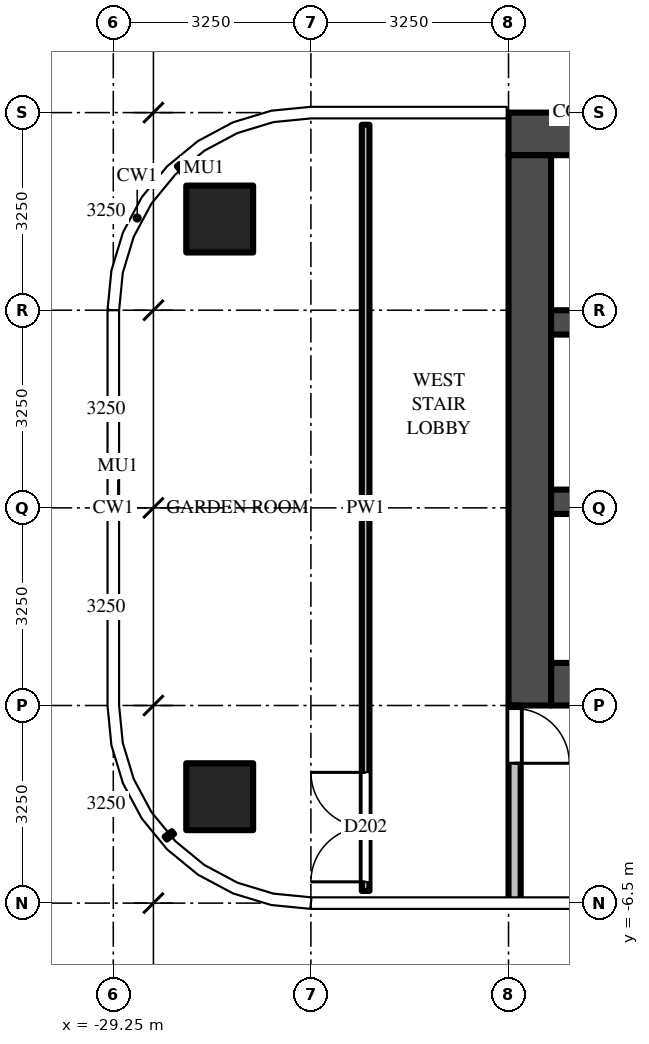
"""IFC4 building model, lengths in metres.
Left out: names, types, materials, properties, quantities, classifications, styles, units other than length and angle.
Written with IfcOpenShell. Run it as: python <this file> out.ifc"""

import sys

from ifc_helpers import new_model, si_unit, direction, frame, frame_2d, origin, origin_2d, place, context, subcontext, project, spatial, rectangle, extrude, source, transform, mapped, element, fill, save


model = new_model("IFC4")
c1 = context("Model", 3, precision=1e-05, world=origin(), true_north=direction((0.0, 1.0)))
c2 = subcontext(c1, "Body", "Model", "MODEL_VIEW")
j1 = project(units=[si_unit("LENGTHUNIT", "METRE"), si_unit("PLANEANGLEUNIT", "RADIAN")], contexts=[c1])
p1 = place(None, origin())
s1 = spatial("IfcSite", under=j1, at=p1, CompositionType="ELEMENT")
p2 = place(p1, origin())
s2 = spatial("IfcBuilding", under=s1, at=p2, CompositionType="ELEMENT")
p3 = place(p2, frame((0.0, 0.0, 232.4)))
s3 = spatial("IfcBuildingStorey", under=s2, at=p3, CompositionType="ELEMENT", Elevation=232.4)
m1 = source(origin(), c2, "Body", "SweptSolid", [
    extrude(rectangle(XDim=1.1, YDim=1.1, at=origin_2d()), origin(), (0.0, 0.0, 1.0), 3.9),
])
for number, where, z_axis, x_axis in (
    (1, (-27.5, -4.75, 0.0), (0.0, 0.0, 1.0), (1.0, 0.0, 0.0)),
    (2, (-27.5, 4.75, 0.0), (0.0, 0.0, 1.0), (1.0, 0.0, 0.0)),
):
    element("IfcColumn", number, at=place(p3, frame(where, z_axis=z_axis, x_axis=x_axis)), inside=s3, PredefinedType="COLUMN", context=c2, shape_type="MappedRepresentation", body=[
        mapped(m1, transform((0.0, 0.0, 0.0))),
    ])
m2 = source(origin(), c2, "Body", "SweptSolid", [
    extrude(rectangle(XDim=16.6, YDim=0.7, at=frame_2d((8.3, 0.0))), origin(), (0.0, 0.0, 1.0), 3.7),
])
p4 = place(p3, frame((-6.15, 6.15, 0.0), z_axis=(0.0, 0.0, 1.0), x_axis=(-1.0, 0.0, 0.0)))
e3 = element("IfcWall", 3, at=p4, inside=s3, PredefinedType="SHEAR", context=c2, shape_type="MappedRepresentation", body=[
    mapped(m2, transform((0.0, 0.0, 0.0))),
])
m3 = source(origin(), c2, "Body", "SweptSolid", [
    extrude(rectangle(XDim=14.85, YDim=0.7, at=frame_2d((7.425, 0.0))), origin(), (0.0, 0.0, 1.0), 3.7),
])
p5 = place(p3, frame((-7.2, -2.9, 0.0), z_axis=(0.0, 0.0, 1.0), x_axis=(-1.0, 0.0, 0.0)))
e4 = element("IfcWall", 4, at=p5, inside=s3, PredefinedType="SHEAR", context=c2, shape_type="MappedRepresentation", body=[
    mapped(m3, transform((0.0, 0.0, 0.0))),
])
m4 = source(origin(), c2, "Body", "SweptSolid", [
    extrude(rectangle(XDim=1.1, YDim=2.1, at=frame_2d((0.55, 1.05))), frame((0.0, 0.36, 0.0), z_axis=(0.0, -1.0, 0.0), x_axis=(1.0, 0.0, 0.0)), (0.0, 0.0, 1.0), 0.72),
])
p6 = place(p5, frame((0.55, 0.0, 0.0)))
e5 = element("IfcOpeningElement", 5, at=p6, cuts=e4, PredefinedType="OPENING", context=c2, shape_type="MappedRepresentation", body=[
    mapped(m4, transform((0.0, 0.0, 0.0))),
])
p7 = place(p5, frame((3.15, 0.0, 0.0)))
e6 = element("IfcOpeningElement", 6, at=p7, cuts=e4, PredefinedType="OPENING", context=c2, shape_type="MappedRepresentation", body=[
    mapped(m4, transform((0.0, 0.0, 0.0))),
])
m5 = source(origin(), c2, "Body", "SweptSolid", [
    extrude(rectangle(XDim=1.2, YDim=2.1, at=frame_2d((0.6, 1.05))), frame((0.0, 0.36, 0.0), z_axis=(0.0, -1.0, 0.0), x_axis=(1.0, 0.0, 0.0)), (0.0, 0.0, 1.0), 0.72),
])
p8 = place(p5, frame((5.7, 0.0, 0.0)))
e7 = element("IfcOpeningElement", 7, at=p8, cuts=e4, PredefinedType="OPENING", context=c2, shape_type="MappedRepresentation", body=[
    mapped(m5, transform((0.0, 0.0, 0.0))),
])
m6 = source(origin(), c2, "Body", "SweptSolid", [
    extrude(rectangle(XDim=1.3, YDim=2.1, at=frame_2d((0.65, 1.05))), frame((0.0, 0.36, 0.0), z_axis=(0.0, -1.0, 0.0), x_axis=(1.0, 0.0, 0.0)), (0.0, 0.0, 1.0), 0.72),
])
p9 = place(p5, frame((12.2, 0.0, 0.0)))
e8 = element("IfcOpeningElement", 8, at=p9, cuts=e4, PredefinedType="OPENING", context=c2, shape_type="MappedRepresentation", body=[
    mapped(m6, transform((0.0, 0.0, 0.0))),
])
p10 = place(p5, frame((9.85, 0.0, 0.0)))
e9 = element("IfcOpeningElement", 9, at=p10, cuts=e4, PredefinedType="OPENING", context=c2, shape_type="MappedRepresentation", body=[
    mapped(m5, transform((0.0, 0.0, 0.0))),
])
m7 = source(origin(), c2, "Body", "SweptSolid", [
    extrude(rectangle(XDim=1.0, YDim=2.1, at=frame_2d((0.5, 1.05))), frame((0.0, 0.36, 0.0), z_axis=(0.0, -1.0, 0.0), x_axis=(1.0, 0.0, 0.0)), (0.0, 0.0, 1.0), 0.72),
])
p11 = place(p5, frame((7.9, 0.0, 0.0)))
e10 = element("IfcOpeningElement", 10, at=p11, cuts=e4, PredefinedType="OPENING", context=c2, shape_type="MappedRepresentation", body=[
    mapped(m7, transform((0.0, 0.0, 0.0))),
])
m8 = source(origin(), c2, "Body", "SweptSolid", [
    extrude(rectangle(XDim=9.05, YDim=0.7, at=frame_2d((4.525, 0.0))), origin(), (0.0, 0.0, 1.0), 3.7),
])
p12 = place(p3, frame((-22.4, 5.8, 0.0), z_axis=(0.0, 0.0, 1.0), x_axis=(0.0, -1.0, 0.0)))
e11 = element("IfcWall", 11, at=p12, inside=s3, PredefinedType="SHEAR", context=c2, shape_type="MappedRepresentation", body=[
    mapped(m8, transform((0.0, 0.0, 0.0))),
])
m9 = source(origin(), c2, "Body", "SweptSolid", [
    extrude(rectangle(XDim=14.85, YDim=0.4, at=frame_2d((7.425, 0.0))), origin(), (0.0, 0.0, 1.0), 3.7),
])
p13 = place(p3, frame((-7.2, 0.1, 0.0), z_axis=(0.0, 0.0, 1.0), x_axis=(-1.0, 0.0, 0.0)))
e12 = element("IfcWall", 12, at=p13, inside=s3, PredefinedType="SHEAR", context=c2, shape_type="MappedRepresentation", body=[
    mapped(m9, transform((0.0, 0.0, 0.0))),
])
m10 = source(origin(), c2, "Body", "SweptSolid", [
    extrude(rectangle(XDim=1.0, YDim=2.1, at=frame_2d((0.5, 1.05))), frame((0.0, 0.21, 0.0), z_axis=(0.0, -1.0, 0.0), x_axis=(1.0, 0.0, 0.0)), (0.0, 0.0, 1.0), 0.42),
])
p14 = place(p13, frame((7.9, 0.0, 0.0)))
e13 = element("IfcOpeningElement", 13, at=p14, cuts=e12, PredefinedType="OPENING", context=c2, shape_type="MappedRepresentation", body=[
    mapped(m10, transform((0.0, 0.0, 0.0))),
])
m11 = source(origin(), c2, "Body", "SweptSolid", [
    extrude(rectangle(XDim=5.7, YDim=0.4, at=frame_2d((2.85, 0.0))), origin(), (0.0, 0.0, 1.0), 3.7),
])
p15 = place(p3, frame((-16.35, 3.05, 0.0), z_axis=(0.0, 0.0, 1.0), x_axis=(-1.0, 0.0, 0.0)))
e14 = element("IfcWall", 14, at=p15, inside=s3, PredefinedType="SHEAR", context=c2, shape_type="MappedRepresentation", body=[
    mapped(m11, transform((0.0, 0.0, 0.0))),
])
m12 = source(origin(), c2, "Body", "SweptSolid", [
    extrude(rectangle(XDim=3.25, YDim=0.2, at=frame_2d((1.625, 0.0))), origin(), (0.0, 0.0, 1.0), 3.7),
])
p16 = place(p3, frame((-22.65, -3.25, 0.0), z_axis=(0.0, 0.0, 1.0), x_axis=(0.0, -1.0, 0.0)))
e15 = element("IfcWall", 15, at=p16, inside=s3, PredefinedType="PARTITIONING", context=c2, shape_type="MappedRepresentation", body=[
    mapped(m12, transform((0.0, 0.0, 0.0))),
])
m13 = source(origin(), c2, "Body", "SweptSolid", [
    extrude(rectangle(XDim=0.9, YDim=2.1, at=frame_2d((0.45, 1.05))), frame((0.0, 0.11, 0.0), z_axis=(0.0, -1.0, 0.0), x_axis=(1.0, 0.0, 0.0)), (0.0, 0.0, 1.0), 0.22),
])
p17 = place(p16, frame((0.05, 0.0, 0.0)))
e16 = element("IfcOpeningElement", 16, at=p17, cuts=e15, PredefinedType="OPENING", context=c2, shape_type="MappedRepresentation", body=[
    mapped(m13, transform((0.0, 0.0, 0.0))),
])
m14 = source(origin(), c2, "Body", "SweptSolid", [
    extrude(rectangle(XDim=12.6, YDim=0.125, at=frame_2d((6.3, 0.0))), origin(), (0.0, 0.0, 1.0), 2.78),
])
p18 = place(p3, frame((-25.1, -6.3, 0.0), z_axis=(0.0, 0.0, 1.0), x_axis=(0.0, 1.0, 0.0)))
e17 = element("IfcWall", 17, at=p18, inside=s3, PredefinedType="PARTITIONING", context=c2, shape_type="MappedRepresentation", body=[
    mapped(m14, transform((0.0, 0.0, 0.0))),
])
m15 = source(origin(), c2, "Body", "SweptSolid", [
    extrude(rectangle(XDim=1.8, YDim=2.1, at=frame_2d((0.9, 1.05))), frame((0.0, 0.073, 0.0), z_axis=(0.0, -1.0, 0.0), x_axis=(1.0, 0.0, 0.0)), (0.0, 0.0, 1.0), 0.145),
])
p19 = place(p18, frame((0.15, 0.0, 0.0)))
e18 = element("IfcOpeningElement", 18, at=p19, cuts=e17, PredefinedType="OPENING", context=c2, shape_type="MappedRepresentation", body=[
    mapped(m15, transform((0.0, 0.0, 0.0))),
])
m16 = source(origin(), c2, "Body", "SweptSolid", [
    extrude(rectangle(XDim=0.9, YDim=2.1, at=frame_2d((0.45, 1.05))), frame((0.0, 0.025, 0.0), z_axis=(0.0, -1.0, 0.0), x_axis=(1.0, 0.0, 0.0)), (0.0, 0.0, 1.0), 0.05),
])
p20 = place(p17, origin())
e19 = element("IfcDoor", 19, at=p20, inside=s3, OperationType="SINGLE_SWING_RIGHT", PredefinedType="DOOR", context=c2, shape_type="MappedRepresentation", body=[
    mapped(m16, transform((0.0, 0.0, 0.0))),
])
fill(e16, e19)
m17 = source(origin(), c2, "Body", "SweptSolid", [
    extrude(rectangle(XDim=1.8, YDim=2.1, at=frame_2d((0.9, 1.05))), frame((0.0, 0.025, 0.0), z_axis=(0.0, -1.0, 0.0), x_axis=(1.0, 0.0, 0.0)), (0.0, 0.0, 1.0), 0.05),
])
p21 = place(p19, origin())
e20 = element("IfcDoor", 20, at=p21, inside=s3, OperationType="DOUBLE_DOOR_SINGLE_SWING", PredefinedType="DOOR", context=c2, shape_type="MappedRepresentation", body=[
    mapped(m17, transform((0.0, 0.0, 0.0))),
])
fill(e18, e20)
save(model, sys.argv[1])
